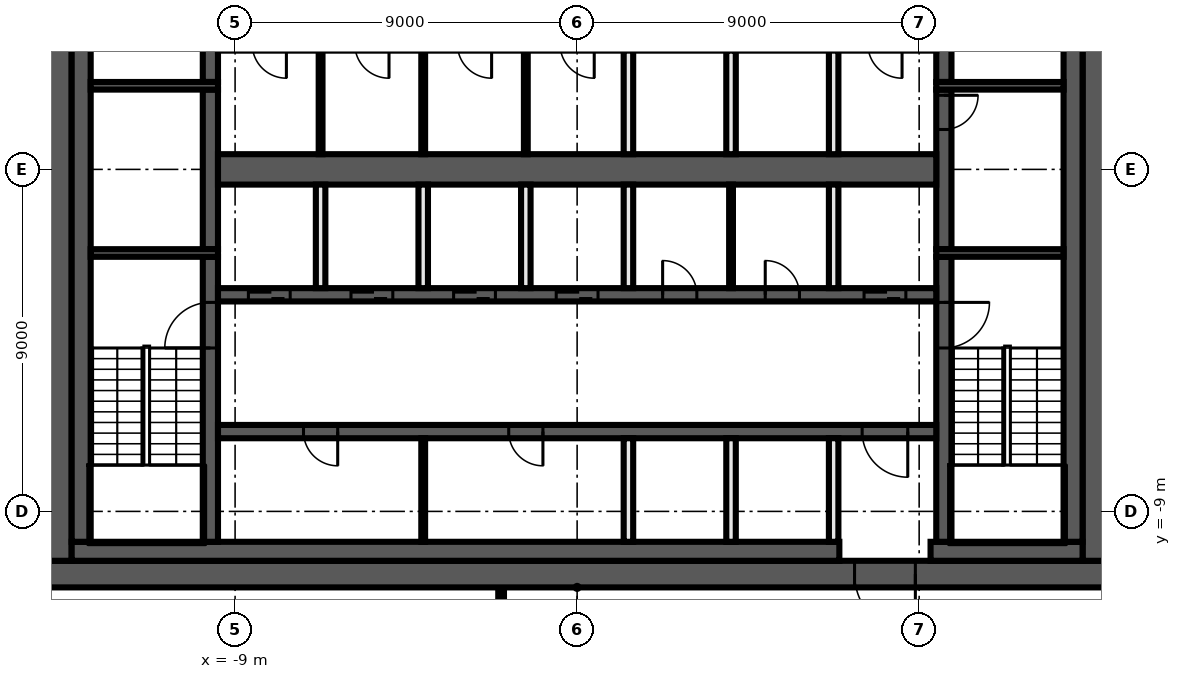
"""IFC4 building model, lengths in metres.
Left out: names, types, materials, properties, quantities, classifications, styles, units other than length and angle.
Written with IfcOpenShell. Run it as: python <this file> out.ifc"""

import sys

from ifc_helpers import new_model, si_unit, direction, frame, frame_2d, origin, place, context, subcontext, project, spatial, rectangle, extrude, element, fill, save


model = new_model("IFC4")
c1 = context("Model", 3, precision=1e-05, world=origin(), true_north=direction((0.0, 1.0)))
c2 = subcontext(c1, "Body", "Model", "MODEL_VIEW")
j1 = project(units=[si_unit("LENGTHUNIT", "METRE"), si_unit("PLANEANGLEUNIT", "RADIAN")], contexts=[c1])
p1 = place(None, origin())
s1 = spatial("IfcSite", under=j1, at=p1, CompositionType="ELEMENT")
p2 = place(p1, origin())
s2 = spatial("IfcBuilding", under=s1, at=p2, CompositionType="ELEMENT")
p3 = place(p2, frame((0.0, 0.0, 237.0)))
s3 = spatial("IfcBuildingStorey", under=s2, at=p3, CompositionType="ELEMENT", Elevation=237.0)
p4 = place(p3, frame((-2.0, -13.325, 0.0), z_axis=(0.0, 0.0, 1.0), x_axis=(0.0, 1.0, 0.0)))
e1 = element("IfcWall", 1, at=p4, inside=s3, PredefinedType="PARTITIONING", context=c2, shape_type="SweptSolid", body=[
    extrude(rectangle(XDim=2.325, YDim=0.15, at=frame_2d((1.163, 0.0))), origin(), (0.0, 0.0, 1.0), 3.82),
])
p5 = place(p3, frame((14.0, -10.65, 0.0), z_axis=(0.0, 0.0, 1.0), x_axis=(-1.0, 0.0, 0.0)))
e2 = element("IfcWall", 2, at=p5, inside=s3, PredefinedType="SHEAR", context=c2, shape_type="SweptSolid", body=[
    extrude(rectangle(XDim=28.0, YDim=0.7, at=frame_2d((14.0, 0.0))), origin(), (0.0, 0.0, 1.0), 3.82),
])
p6 = place(p5, frame((5.1, 0.0, 0.0)))
e3 = element("IfcOpeningElement", 3, at=p6, cuts=e2, PredefinedType="OPENING", context=c2, shape_type="SweptSolid", body=[
    extrude(rectangle(XDim=1.6, YDim=2.1, at=frame_2d((0.8, 1.05))), frame((0.0, 0.36, 0.0), z_axis=(0.0, -1.0, 0.0), x_axis=(1.0, 0.0, 0.0)), (0.0, 0.0, 1.0), 0.72),
])
for number, where, z_axis, x_axis in (
    (4, (13.65, 10.3, 0.0), (0.0, 0.0, 1.0), (0.0, -1.0, 0.0)),
    (5, (-13.65, -10.3, 0.0), (0.0, 0.0, 1.0), (0.0, 1.0, 0.0)),
):
    element("IfcWall", number, at=place(p3, frame(where, z_axis=z_axis, x_axis=x_axis)), inside=s3, PredefinedType="SHEAR", context=c2, shape_type="SweptSolid", body=[
        extrude(rectangle(XDim=20.6, YDim=0.7, at=frame_2d((10.3, 0.0))), origin(), (0.0, 0.0, 1.0), 3.82),
    ])
p7 = place(p3, frame((13.3, -10.05, 0.0), z_axis=(0.0, 0.0, 1.0), x_axis=(-1.0, 0.0, 0.0)))
e6 = element("IfcWall", 6, at=p7, inside=s3, PredefinedType="SHEAR", context=c2, shape_type="SweptSolid", body=[
    extrude(rectangle(XDim=4.0, YDim=0.5, at=frame_2d((2.0, 0.0))), origin(), (0.0, 0.0, 1.0), 3.82),
])
p8 = place(p3, frame((6.9, -10.05, 0.0), z_axis=(0.0, 0.0, 1.0), x_axis=(-1.0, 0.0, 0.0)))
e7 = element("IfcWall", 7, at=p8, inside=s3, PredefinedType="SHEAR", context=c2, shape_type="SweptSolid", body=[
    extrude(rectangle(XDim=20.2, YDim=0.5, at=frame_2d((10.1, 0.0))), origin(), (0.0, 0.0, 1.0), 3.82),
])
for number, where, z_axis, x_axis in (
    (8, (13.05, 9.8, 0.0), (0.0, 0.0, 1.0), (0.0, -1.0, 0.0)),
    (9, (-13.05, -9.8, 0.0), (0.0, 0.0, 1.0), (0.0, 1.0, 0.0)),
):
    element("IfcWall", number, at=place(p3, frame(where, z_axis=z_axis, x_axis=x_axis)), inside=s3, PredefinedType="SHEAR", context=c2, shape_type="SweptSolid", body=[
        extrude(rectangle(XDim=19.6, YDim=0.5, at=frame_2d((9.8, 0.0))), origin(), (0.0, 0.0, 1.0), 3.82),
    ])
p9 = place(p3, frame((9.65, -2.3, 0.0), z_axis=(0.0, 0.0, 1.0), x_axis=(0.0, -1.0, 0.0)))
e10 = element("IfcWall", 10, at=p9, inside=s3, PredefinedType="SHEAR", context=c2, shape_type="SweptSolid", body=[
    extrude(rectangle(XDim=7.5, YDim=0.4, at=frame_2d((3.75, 0.0))), origin(), (0.0, 0.0, 1.0), 3.82),
])
p10 = place(p9, frame((1.2, 0.0, 0.0)))
e11 = element("IfcOpeningElement", 11, at=p10, cuts=e10, PredefinedType="OPENING", context=c2, shape_type="SweptSolid", body=[
    extrude(rectangle(XDim=1.2, YDim=2.1, at=frame_2d((0.6, 1.05))), frame((0.0, 0.21, 0.0), z_axis=(0.0, -1.0, 0.0), x_axis=(1.0, 0.0, 0.0)), (0.0, 0.0, 1.0), 0.42),
])
p11 = place(p3, frame((9.65, 2.1, 0.0), z_axis=(0.0, 0.0, 1.0), x_axis=(0.0, -1.0, 0.0)))
e12 = element("IfcWall", 12, at=p11, inside=s3, PredefinedType="SHEAR", context=c2, shape_type="SweptSolid", body=[
    extrude(rectangle(XDim=4.2, YDim=0.4, at=frame_2d((2.1, 0.0))), origin(), (0.0, 0.0, 1.0), 3.82),
])
p12 = place(p11, frame((0.15, 0.0, 0.0)))
e13 = element("IfcOpeningElement", 13, at=p12, cuts=e12, PredefinedType="OPENING", context=c2, shape_type="SweptSolid", body=[
    extrude(rectangle(XDim=0.9, YDim=2.1, at=frame_2d((0.45, 1.05))), frame((0.0, 0.21, 0.0), z_axis=(0.0, -1.0, 0.0), x_axis=(1.0, 0.0, 0.0)), (0.0, 0.0, 1.0), 0.42),
])
p13 = place(p3, frame((9.65, 9.8, 0.0), z_axis=(0.0, 0.0, 1.0), x_axis=(0.0, -1.0, 0.0)))
e14 = element("IfcWall", 14, at=p13, inside=s3, PredefinedType="SHEAR", context=c2, shape_type="SweptSolid", body=[
    extrude(rectangle(XDim=7.5, YDim=0.4, at=frame_2d((3.75, 0.0))), origin(), (0.0, 0.0, 1.0), 3.82),
])
p14 = place(p13, frame((5.1, 0.0, 0.0)))
e15 = element("IfcOpeningElement", 15, at=p14, cuts=e14, PredefinedType="OPENING", context=c2, shape_type="SweptSolid", body=[
    extrude(rectangle(XDim=1.2, YDim=2.1, at=frame_2d((0.6, 1.05))), frame((0.0, 0.21, 0.0), z_axis=(0.0, -1.0, 0.0), x_axis=(1.0, 0.0, 0.0)), (0.0, 0.0, 1.0), 0.42),
])
p15 = place(p3, frame((-9.65, -9.8, 0.0), z_axis=(0.0, 0.0, 1.0), x_axis=(0.0, 1.0, 0.0)))
e16 = element("IfcWall", 16, at=p15, inside=s3, PredefinedType="SHEAR", context=c2, shape_type="SweptSolid", body=[
    extrude(rectangle(XDim=7.5, YDim=0.4, at=frame_2d((3.75, 0.0))), origin(), (0.0, 0.0, 1.0), 3.82),
])
p16 = place(p15, frame((5.1, 0.0, 0.0)))
e17 = element("IfcOpeningElement", 17, at=p16, cuts=e16, PredefinedType="OPENING", context=c2, shape_type="SweptSolid", body=[
    extrude(rectangle(XDim=1.2, YDim=2.1, at=frame_2d((0.6, 1.05))), frame((0.0, 0.21, 0.0), z_axis=(0.0, -1.0, 0.0), x_axis=(1.0, 0.0, 0.0)), (0.0, 0.0, 1.0), 0.42),
])
p17 = place(p3, frame((-9.65, -2.1, 0.0), z_axis=(0.0, 0.0, 1.0), x_axis=(0.0, 1.0, 0.0)))
e18 = element("IfcWall", 18, at=p17, inside=s3, PredefinedType="SHEAR", context=c2, shape_type="SweptSolid", body=[
    extrude(rectangle(XDim=4.2, YDim=0.4, at=frame_2d((2.1, 0.0))), origin(), (0.0, 0.0, 1.0), 3.82),
])
p18 = place(p3, frame((-9.65, 2.3, 0.0), z_axis=(0.0, 0.0, 1.0), x_axis=(0.0, 1.0, 0.0)))
e19 = element("IfcWall", 19, at=p18, inside=s3, PredefinedType="SHEAR", context=c2, shape_type="SweptSolid", body=[
    extrude(rectangle(XDim=7.5, YDim=0.4, at=frame_2d((3.75, 0.0))), origin(), (0.0, 0.0, 1.0), 3.82),
])
p19 = place(p18, frame((1.2, 0.0, 0.0)))
e20 = element("IfcOpeningElement", 20, at=p19, cuts=e19, PredefinedType="OPENING", context=c2, shape_type="SweptSolid", body=[
    extrude(rectangle(XDim=1.2, YDim=2.1, at=frame_2d((0.6, 1.05))), frame((0.0, 0.21, 0.0), z_axis=(0.0, -1.0, 0.0), x_axis=(1.0, 0.0, 0.0)), (0.0, 0.0, 1.0), 0.42),
])
for number, where, z_axis, x_axis in (
    (21, (9.45, 2.2, 0.0), (0.0, 0.0, 1.0), (1.0, 0.0, 0.0)),
    (22, (-9.45, 2.2, 0.0), (0.0, 0.0, 1.0), (-1.0, 0.0, 0.0)),
    (23, (9.45, -2.2, 0.0), (0.0, 0.0, 1.0), (1.0, 0.0, 0.0)),
    (24, (-9.45, -2.2, 0.0), (0.0, 0.0, 1.0), (-1.0, 0.0, 0.0)),
):
    element("IfcWall", number, at=place(p3, frame(where, z_axis=z_axis, x_axis=x_axis)), inside=s3, PredefinedType="SHEAR", context=c2, shape_type="SweptSolid", body=[
        extrude(rectangle(XDim=3.35, YDim=0.2, at=frame_2d((1.675, 0.0))), origin(), (0.0, 0.0, 1.0), 3.82),
    ])
p20 = place(p3, frame((-9.45, -3.3, 0.0), z_axis=(0.0, 0.0, 1.0), x_axis=(1.0, 0.0, 0.0)))
e25 = element("IfcWall", 25, at=p20, inside=s3, PredefinedType="SHEAR", context=c2, shape_type="SweptSolid", body=[
    extrude(rectangle(XDim=18.9, YDim=0.35, at=frame_2d((9.45, 0.0))), origin(), (0.0, 0.0, 1.0), 3.82),
])
p21 = place(p20, frame((0.8, 0.0, 0.0)))
e26 = element("IfcOpeningElement", 26, at=p21, cuts=e25, PredefinedType="OPENING", context=c2, shape_type="SweptSolid", body=[
    extrude(rectangle(XDim=1.1, YDim=2.1, at=frame_2d((0.55, 1.05))), frame((0.0, 0.185, 0.0), z_axis=(0.0, -1.0, 0.0), x_axis=(1.0, 0.0, 0.0)), (0.0, 0.0, 1.0), 0.37),
])
p22 = place(p20, frame((3.5, 0.0, 0.0)))
e27 = element("IfcOpeningElement", 27, at=p22, cuts=e25, PredefinedType="OPENING", context=c2, shape_type="SweptSolid", body=[
    extrude(rectangle(XDim=1.1, YDim=2.1, at=frame_2d((0.55, 1.05))), frame((0.0, 0.185, 0.0), z_axis=(0.0, -1.0, 0.0), x_axis=(1.0, 0.0, 0.0)), (0.0, 0.0, 1.0), 0.37),
])
p23 = place(p20, frame((6.2, 0.0, 0.0)))
e28 = element("IfcOpeningElement", 28, at=p23, cuts=e25, PredefinedType="OPENING", context=c2, shape_type="SweptSolid", body=[
    extrude(rectangle(XDim=1.1, YDim=2.1, at=frame_2d((0.55, 1.05))), frame((0.0, 0.185, 0.0), z_axis=(0.0, -1.0, 0.0), x_axis=(1.0, 0.0, 0.0)), (0.0, 0.0, 1.0), 0.37),
])
p24 = place(p20, frame((8.9, 0.0, 0.0)))
e29 = element("IfcOpeningElement", 29, at=p24, cuts=e25, PredefinedType="OPENING", context=c2, shape_type="SweptSolid", body=[
    extrude(rectangle(XDim=1.1, YDim=2.1, at=frame_2d((0.55, 1.05))), frame((0.0, 0.185, 0.0), z_axis=(0.0, -1.0, 0.0), x_axis=(1.0, 0.0, 0.0)), (0.0, 0.0, 1.0), 0.37),
])
p25 = place(p20, frame((17.0, 0.0, 0.0)))
e30 = element("IfcOpeningElement", 30, at=p25, cuts=e25, PredefinedType="OPENING", context=c2, shape_type="SweptSolid", body=[
    extrude(rectangle(XDim=1.1, YDim=2.1, at=frame_2d((0.55, 1.05))), frame((0.0, 0.185, 0.0), z_axis=(0.0, -1.0, 0.0), x_axis=(1.0, 0.0, 0.0)), (0.0, 0.0, 1.0), 0.37),
])
p26 = place(p20, frame((11.7, 0.0, 0.0)))
e31 = element("IfcOpeningElement", 31, at=p26, cuts=e25, PredefinedType="OPENING", context=c2, shape_type="SweptSolid", body=[
    extrude(rectangle(XDim=0.9, YDim=2.1, at=frame_2d((0.45, 1.05))), frame((0.0, 0.185, 0.0), z_axis=(0.0, -1.0, 0.0), x_axis=(1.0, 0.0, 0.0)), (0.0, 0.0, 1.0), 0.37),
])
p27 = place(p20, frame((14.4, 0.0, 0.0)))
e32 = element("IfcOpeningElement", 32, at=p27, cuts=e25, PredefinedType="OPENING", context=c2, shape_type="SweptSolid", body=[
    extrude(rectangle(XDim=0.9, YDim=2.1, at=frame_2d((0.45, 1.05))), frame((0.0, 0.185, 0.0), z_axis=(0.0, -1.0, 0.0), x_axis=(1.0, 0.0, 0.0)), (0.0, 0.0, 1.0), 0.37),
])
p28 = place(p3, frame((9.45, -6.9, 0.0), z_axis=(0.0, 0.0, 1.0), x_axis=(-1.0, 0.0, 0.0)))
e33 = element("IfcWall", 33, at=p28, inside=s3, PredefinedType="SHEAR", context=c2, shape_type="SweptSolid", body=[
    extrude(rectangle(XDim=18.9, YDim=0.35, at=frame_2d((9.45, 0.0))), origin(), (0.0, 0.0, 1.0), 3.82),
])
p29 = place(p28, frame((0.75, 0.0, 0.0)))
e34 = element("IfcOpeningElement", 34, at=p29, cuts=e33, PredefinedType="OPENING", context=c2, shape_type="SweptSolid", body=[
    extrude(rectangle(XDim=1.2, YDim=2.1, at=frame_2d((0.6, 1.05))), frame((0.0, 0.185, 0.0), z_axis=(0.0, -1.0, 0.0), x_axis=(1.0, 0.0, 0.0)), (0.0, 0.0, 1.0), 0.37),
])
p30 = place(p28, frame((15.75, 0.0, 0.0)))
e35 = element("IfcOpeningElement", 35, at=p30, cuts=e33, PredefinedType="OPENING", context=c2, shape_type="SweptSolid", body=[
    extrude(rectangle(XDim=0.9, YDim=2.1, at=frame_2d((0.45, 1.05))), frame((0.0, 0.185, 0.0), z_axis=(0.0, -1.0, 0.0), x_axis=(1.0, 0.0, 0.0)), (0.0, 0.0, 1.0), 0.37),
])
p31 = place(p28, frame((10.35, 0.0, 0.0)))
e36 = element("IfcOpeningElement", 36, at=p31, cuts=e33, PredefinedType="OPENING", context=c2, shape_type="SweptSolid", body=[
    extrude(rectangle(XDim=0.9, YDim=2.1, at=frame_2d((0.45, 1.05))), frame((0.0, 0.185, 0.0), z_axis=(0.0, -1.0, 0.0), x_axis=(1.0, 0.0, 0.0)), (0.0, 0.0, 1.0), 0.37),
])
p32 = place(p3, frame((-9.45, 0.0, 0.0), z_axis=(0.0, 0.0, 1.0), x_axis=(1.0, 0.0, 0.0)))
e37 = element("IfcWall", 37, at=p32, inside=s3, PredefinedType="SHEAR", context=c2, shape_type="SweptSolid", body=[
    extrude(rectangle(XDim=18.9, YDim=0.8, at=frame_2d((9.45, 0.0))), origin(), (0.0, 0.0, 1.0), 3.82),
])
for number, where, z_axis, x_axis in (
    (38, (6.75, -9.8, 0.0), (0.0, 0.0, 1.0), (0.0, 1.0, 0.0)),
    (39, (6.75, -3.125, 0.0), (0.0, 0.0, 1.0), (0.0, 1.0, 0.0)),
    (40, (6.75, 0.4, 0.0), (0.0, 0.0, 1.0), (0.0, 1.0, 0.0)),
):
    element("IfcWall", number, at=place(p3, frame(where, z_axis=z_axis, x_axis=x_axis)), inside=s3, PredefinedType="SOLIDWALL", context=c2, shape_type="SweptSolid", body=[
        extrude(rectangle(XDim=2.725, YDim=0.25, at=frame_2d((1.363, 0.0))), origin(), (0.0, 0.0, 1.0), 3.82),
    ])
p33 = place(p3, frame((4.05, -3.125, 0.0), z_axis=(0.0, 0.0, 1.0), x_axis=(0.0, 1.0, 0.0)))
e41 = element("IfcWall", 41, at=p33, inside=s3, PredefinedType="PARTITIONING", context=c2, shape_type="SweptSolid", body=[
    extrude(rectangle(XDim=2.725, YDim=0.1, at=frame_2d((1.363, 0.0))), origin(), (0.0, 0.0, 1.0), 3.82),
])
for number, where, z_axis, x_axis in (
    (42, (4.05, -9.8, 0.0), (0.0, 0.0, 1.0), (0.0, 1.0, 0.0)),
    (43, (4.05, 0.4, 0.0), (0.0, 0.0, 1.0), (0.0, 1.0, 0.0)),
    (44, (1.35, -9.8, 0.0), (0.0, 0.0, 1.0), (0.0, 1.0, 0.0)),
    (45, (1.35, -3.125, 0.0), (0.0, 0.0, 1.0), (0.0, 1.0, 0.0)),
    (46, (1.35, 0.4, 0.0), (0.0, 0.0, 1.0), (0.0, 1.0, 0.0)),
):
    element("IfcWall", number, at=place(p3, frame(where, z_axis=z_axis, x_axis=x_axis)), inside=s3, PredefinedType="SOLIDWALL", context=c2, shape_type="SweptSolid", body=[
        extrude(rectangle(XDim=2.725, YDim=0.25, at=frame_2d((1.363, 0.0))), origin(), (0.0, 0.0, 1.0), 3.82),
    ])
p34 = place(p3, frame((-1.35, 0.4, 0.0), z_axis=(0.0, 0.0, 1.0), x_axis=(0.0, 1.0, 0.0)))
e47 = element("IfcWall", 47, at=p34, inside=s3, PredefinedType="PARTITIONING", context=c2, shape_type="SweptSolid", body=[
    extrude(rectangle(XDim=2.725, YDim=0.1, at=frame_2d((1.363, 0.0))), origin(), (0.0, 0.0, 1.0), 3.82),
])
p35 = place(p3, frame((-1.35, -3.125, 0.0), z_axis=(0.0, 0.0, 1.0), x_axis=(0.0, 1.0, 0.0)))
e48 = element("IfcWall", 48, at=p35, inside=s3, PredefinedType="SOLIDWALL", context=c2, shape_type="SweptSolid", body=[
    extrude(rectangle(XDim=2.725, YDim=0.25, at=frame_2d((1.363, 0.0))), origin(), (0.0, 0.0, 1.0), 3.82),
])
for number, where, z_axis, x_axis in (
    (49, (-4.05, -9.8, 0.0), (0.0, 0.0, 1.0), (0.0, 1.0, 0.0)),
    (50, (-4.05, 0.4, 0.0), (0.0, 0.0, 1.0), (0.0, 1.0, 0.0)),
):
    element("IfcWall", number, at=place(p3, frame(where, z_axis=z_axis, x_axis=x_axis)), inside=s3, PredefinedType="PARTITIONING", context=c2, shape_type="SweptSolid", body=[
        extrude(rectangle(XDim=2.725, YDim=0.1, at=frame_2d((1.363, 0.0))), origin(), (0.0, 0.0, 1.0), 3.82),
    ])
p36 = place(p3, frame((-4.05, -3.125, 0.0), z_axis=(0.0, 0.0, 1.0), x_axis=(0.0, 1.0, 0.0)))
e51 = element("IfcWall", 51, at=p36, inside=s3, PredefinedType="SOLIDWALL", context=c2, shape_type="SweptSolid", body=[
    extrude(rectangle(XDim=2.725, YDim=0.25, at=frame_2d((1.363, 0.0))), origin(), (0.0, 0.0, 1.0), 3.82),
])
p37 = place(p3, frame((-6.75, 0.4, 0.0), z_axis=(0.0, 0.0, 1.0), x_axis=(0.0, 1.0, 0.0)))
e52 = element("IfcWall", 52, at=p37, inside=s3, PredefinedType="PARTITIONING", context=c2, shape_type="SweptSolid", body=[
    extrude(rectangle(XDim=2.725, YDim=0.1, at=frame_2d((1.363, 0.0))), origin(), (0.0, 0.0, 1.0), 3.82),
])
p38 = place(p3, frame((-6.75, -3.125, 0.0), z_axis=(0.0, 0.0, 1.0), x_axis=(0.0, 1.0, 0.0)))
e53 = element("IfcWall", 53, at=p38, inside=s3, PredefinedType="SOLIDWALL", context=c2, shape_type="SweptSolid", body=[
    extrude(rectangle(XDim=2.725, YDim=0.25, at=frame_2d((1.363, 0.0))), origin(), (0.0, 0.0, 1.0), 3.82),
])
p39 = place(p12, origin())
e54 = element("IfcDoor", 54, at=p39, inside=s3, OperationType="SINGLE_SWING_RIGHT", PredefinedType="DOOR", context=c2, shape_type="SweptSolid", body=[
    extrude(rectangle(XDim=0.9, YDim=2.1, at=frame_2d((0.45, 1.05))), frame((0.0, 0.025, 0.0), z_axis=(0.0, -1.0, 0.0), x_axis=(1.0, 0.0, 0.0)), (0.0, 0.0, 1.0), 0.05),
])
fill(e13, e54)
p40 = place(p21, origin())
e55 = element("IfcDoor", 55, at=p40, inside=s3, OperationType="DOUBLE_DOOR_SLIDING", PredefinedType="DOOR", context=c2, shape_type="SweptSolid", body=[
    extrude(rectangle(XDim=1.1, YDim=2.1, at=frame_2d((0.55, 1.05))), frame((0.0, 0.025, 0.0), z_axis=(0.0, -1.0, 0.0), x_axis=(1.0, 0.0, 0.0)), (0.0, 0.0, 1.0), 0.05),
])
fill(e26, e55)
p41 = place(p22, origin())
e56 = element("IfcDoor", 56, at=p41, inside=s3, OperationType="DOUBLE_DOOR_SLIDING", PredefinedType="DOOR", context=c2, shape_type="SweptSolid", body=[
    extrude(rectangle(XDim=1.1, YDim=2.1, at=frame_2d((0.55, 1.05))), frame((0.0, 0.025, 0.0), z_axis=(0.0, -1.0, 0.0), x_axis=(1.0, 0.0, 0.0)), (0.0, 0.0, 1.0), 0.05),
])
fill(e27, e56)
p42 = place(p23, origin())
e57 = element("IfcDoor", 57, at=p42, inside=s3, OperationType="DOUBLE_DOOR_SLIDING", PredefinedType="DOOR", context=c2, shape_type="SweptSolid", body=[
    extrude(rectangle(XDim=1.1, YDim=2.1, at=frame_2d((0.55, 1.05))), frame((0.0, 0.025, 0.0), z_axis=(0.0, -1.0, 0.0), x_axis=(1.0, 0.0, 0.0)), (0.0, 0.0, 1.0), 0.05),
])
fill(e28, e57)
p43 = place(p24, origin())
e58 = element("IfcDoor", 58, at=p43, inside=s3, OperationType="DOUBLE_DOOR_SLIDING", PredefinedType="DOOR", context=c2, shape_type="SweptSolid", body=[
    extrude(rectangle(XDim=1.1, YDim=2.1, at=frame_2d((0.55, 1.05))), frame((0.0, 0.025, 0.0), z_axis=(0.0, -1.0, 0.0), x_axis=(1.0, 0.0, 0.0)), (0.0, 0.0, 1.0), 0.05),
])
fill(e29, e58)
p44 = place(p25, origin())
e59 = element("IfcDoor", 59, at=p44, inside=s3, OperationType="DOUBLE_DOOR_SLIDING", PredefinedType="DOOR", context=c2, shape_type="SweptSolid", body=[
    extrude(rectangle(XDim=1.1, YDim=2.1, at=frame_2d((0.55, 1.05))), frame((0.0, 0.025, 0.0), z_axis=(0.0, -1.0, 0.0), x_axis=(1.0, 0.0, 0.0)), (0.0, 0.0, 1.0), 0.05),
])
fill(e30, e59)
p45 = place(p6, origin())
e60 = element("IfcDoor", 60, at=p45, inside=s3, OperationType="DOUBLE_DOOR_SINGLE_SWING", PredefinedType="DOOR", context=c2, shape_type="SweptSolid", body=[
    extrude(rectangle(XDim=1.6, YDim=2.1, at=frame_2d((0.8, 1.05))), frame((0.0, 0.025, 0.0), z_axis=(0.0, -1.0, 0.0), x_axis=(1.0, 0.0, 0.0)), (0.0, 0.0, 1.0), 0.05),
])
fill(e3, e60)
p46 = place(p29, origin())
e61 = element("IfcDoor", 61, at=p46, inside=s3, OperationType="SINGLE_SWING_LEFT", PredefinedType="DOOR", context=c2, shape_type="SweptSolid", body=[
    extrude(rectangle(XDim=1.2, YDim=2.1, at=frame_2d((0.6, 1.05))), frame((0.0, 0.025, 0.0), z_axis=(0.0, -1.0, 0.0), x_axis=(1.0, 0.0, 0.0)), (0.0, 0.0, 1.0), 0.05),
])
fill(e34, e61)
p47 = place(p26, origin())
e62 = element("IfcDoor", 62, at=p47, inside=s3, OperationType="SINGLE_SWING_RIGHT", PredefinedType="DOOR", context=c2, shape_type="SweptSolid", body=[
    extrude(rectangle(XDim=0.9, YDim=2.1, at=frame_2d((0.45, 1.05))), frame((0.0, 0.025, 0.0), z_axis=(0.0, -1.0, 0.0), x_axis=(1.0, 0.0, 0.0)), (0.0, 0.0, 1.0), 0.05),
])
fill(e31, e62)
p48 = place(p27, origin())
e63 = element("IfcDoor", 63, at=p48, inside=s3, OperationType="SINGLE_SWING_LEFT", PredefinedType="DOOR", context=c2, shape_type="SweptSolid", body=[
    extrude(rectangle(XDim=0.9, YDim=2.1, at=frame_2d((0.45, 1.05))), frame((0.0, 0.025, 0.0), z_axis=(0.0, -1.0, 0.0), x_axis=(1.0, 0.0, 0.0)), (0.0, 0.0, 1.0), 0.05),
])
fill(e32, e63)
p49 = place(p30, origin())
e64 = element("IfcDoor", 64, at=p49, inside=s3, OperationType="SINGLE_SWING_RIGHT", PredefinedType="DOOR", context=c2, shape_type="SweptSolid", body=[
    extrude(rectangle(XDim=0.9, YDim=2.1, at=frame_2d((0.45, 1.05))), frame((0.0, 0.025, 0.0), z_axis=(0.0, -1.0, 0.0), x_axis=(1.0, 0.0, 0.0)), (0.0, 0.0, 1.0), 0.05),
])
fill(e35, e64)
p50 = place(p31, origin())
e65 = element("IfcDoor", 65, at=p50, inside=s3, OperationType="SINGLE_SWING_LEFT", PredefinedType="DOOR", context=c2, shape_type="SweptSolid", body=[
    extrude(rectangle(XDim=0.9, YDim=2.1, at=frame_2d((0.45, 1.05))), frame((0.0, 0.025, 0.0), z_axis=(0.0, -1.0, 0.0), x_axis=(1.0, 0.0, 0.0)), (0.0, 0.0, 1.0), 0.05),
])
fill(e36, e65)
p51 = place(p10, origin())
e66 = element("IfcDoor", 66, at=p51, inside=s3, OperationType="SINGLE_SWING_RIGHT", PredefinedType="DOOR", context=c2, shape_type="SweptSolid", body=[
    extrude(rectangle(XDim=1.2, YDim=2.1, at=frame_2d((0.6, 1.05))), frame((0.0, 0.025, 0.0), z_axis=(0.0, -1.0, 0.0), x_axis=(1.0, 0.0, 0.0)), (0.0, 0.0, 1.0), 0.05),
])
fill(e11, e66)
p52 = place(p16, origin())
e67 = element("IfcDoor", 67, at=p52, inside=s3, OperationType="SINGLE_SWING_LEFT", PredefinedType="DOOR", context=c2, shape_type="SweptSolid", body=[
    extrude(rectangle(XDim=1.2, YDim=2.1, at=frame_2d((0.6, 1.05))), frame((0.0, 0.025, 0.0), z_axis=(0.0, -1.0, 0.0), x_axis=(1.0, 0.0, 0.0)), (0.0, 0.0, 1.0), 0.05),
])
fill(e17, e67)
save(model, sys.argv[1])
